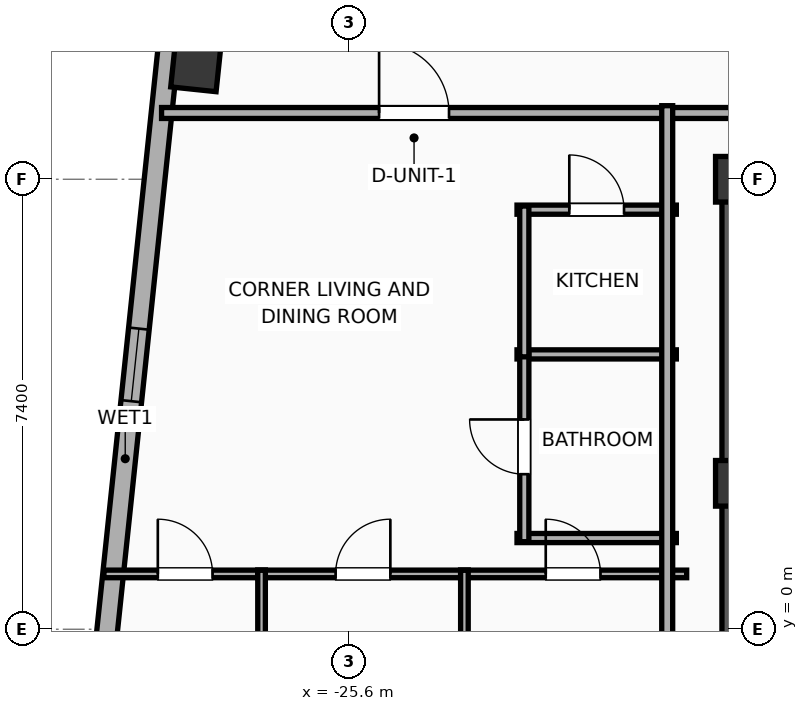
"""IFC4 building model, lengths in metres.
Left out: names, types, materials, properties, quantities, classifications, styles, units other than length and angle.
Written with IfcOpenShell. Run it as: python <this file> out.ifc"""

import sys

from ifc_helpers import new_model, si_unit, direction, frame, frame_2d, origin, origin_2d, place, context, subcontext, project, spatial, rectangle, hollow_rectangle, extrude, element, fill, save


model = new_model("IFC4")
c1 = context("Model", 3, precision=1e-05, world=origin(), true_north=direction((0.0, 1.0)))
c2 = subcontext(c1, "Body", "Model", "MODEL_VIEW")
j1 = project(units=[si_unit("LENGTHUNIT", "METRE"), si_unit("PLANEANGLEUNIT", "RADIAN")], contexts=[c1])
p1 = place(None, origin())
s1 = spatial("IfcSite", under=j1, at=p1, CompositionType="ELEMENT")
p2 = place(p1, origin())
s2 = spatial("IfcBuilding", under=s1, at=p2, CompositionType="ELEMENT")
p3 = place(p2, frame((0.0, 0.0, 271.7)))
s3 = spatial("IfcBuildingStorey", under=s2, at=p3, CompositionType="ELEMENT", Elevation=271.7)
for number, where, z_axis, x_axis in (
    (1, (-19.2, 2.4, 0.0), (0.0, 0.0, 1.0), (1.0, 0.0, 0.0)),
    (2, (-19.2, 7.4, 0.0), (0.0, 0.0, 1.0), (1.0, 0.0, 0.0)),
):
    element("IfcColumn", number, at=place(p3, frame(where, z_axis=z_axis, x_axis=x_axis)), inside=s3, PredefinedType="COLUMN", context=c2, shape_type="SweptSolid", body=[
        extrude(rectangle(XDim=0.75, YDim=0.75, at=origin_2d()), origin(), (0.0, 0.0, 1.0), 3.9),
    ])
p4 = place(p3, frame((-19.425, 7.4, 0.0), z_axis=(0.0, 0.0, 1.0), x_axis=(1.0, 0.0, 0.0)))
e3 = element("IfcWall", 3, at=p4, inside=s3, PredefinedType="SHEAR", context=c2, shape_type="SweptSolid", body=[
    extrude(rectangle(XDim=7.25, YDim=0.45, at=frame_2d((3.625, 0.0))), origin(), (0.0, 0.0, 1.0), 3.65),
])
p5 = place(p3, frame((-19.145, -7.4, 0.0), z_axis=(0.0, 0.0, 1.0), x_axis=(0.0, 1.0, 0.0)))
e4 = element("IfcWall", 4, at=p5, inside=s3, PredefinedType="SHEAR", context=c2, shape_type="SweptSolid", body=[
    extrude(rectangle(XDim=14.8, YDim=0.65, at=frame_2d((7.4, 0.0))), origin(), (0.0, 0.0, 1.0), 3.65),
])
p6 = place(p3, frame((-28.123, 9.252, 0.0), z_axis=(0.0, 0.0, 1.0), x_axis=(0.994521895368, -0.104528463268, 0.0)))
e5 = element("IfcColumn", 5, at=p6, inside=s3, PredefinedType="COLUMN", context=c2, shape_type="SweptSolid", body=[
    extrude(hollow_rectangle(XDim=0.75, YDim=0.75, WallThickness=0.025, at=origin_2d()), origin(), (0.0, 0.0, 1.0), 3.9),
])
p7 = place(p3, frame((-30.87, -12.296, 0.0), z_axis=(0.0, 0.0, 1.0), x_axis=(0.104533282919, 0.994521388791, 0.0)))
e6 = element("IfcWall", 6, at=p7, inside=s3, PredefinedType="ELEMENTEDWALL", context=c2, shape_type="SweptSolid", body=[
    extrude(rectangle(XDim=30.366, YDim=0.34, at=frame_2d((15.183, 0.0))), origin(), (0.0, 0.0, 1.0), 3.65),
])
p8 = place(p7, frame((5.842, 0.0, 0.75)))
e7 = element("IfcOpeningElement", 7, at=p8, cuts=e6, PredefinedType="OPENING", context=c2, shape_type="SweptSolid", body=[
    extrude(rectangle(XDim=1.8, YDim=2.1, at=frame_2d((0.9, 1.05))), frame((0.0, 0.18, 0.0), z_axis=(0.0, -1.0, 0.0), x_axis=(1.0, 0.0, 0.0)), (0.0, 0.0, 1.0), 0.36),
])
p9 = place(p7, frame((23.525, 0.0, 0.75)))
e8 = element("IfcOpeningElement", 8, at=p9, cuts=e6, PredefinedType="OPENING", context=c2, shape_type="SweptSolid", body=[
    extrude(rectangle(XDim=1.8, YDim=2.1, at=frame_2d((0.9, 1.05))), frame((0.0, 0.18, 0.0), z_axis=(0.0, -1.0, 0.0), x_axis=(1.0, 0.0, 0.0)), (0.0, 0.0, 1.0), 0.36),
])
p10 = place(p7, frame((27.017, 0.0, 0.75)))
e9 = element("IfcOpeningElement", 9, at=p10, cuts=e6, PredefinedType="OPENING", context=c2, shape_type="SweptSolid", body=[
    extrude(rectangle(XDim=1.2, YDim=2.05, at=frame_2d((0.6, 1.025))), frame((0.0, 0.18, 0.0), z_axis=(0.0, -1.0, 0.0), x_axis=(1.0, 0.0, 0.0)), (0.0, 0.0, 1.0), 0.36),
])
p11 = place(p7, frame((16.135, 0.0, 0.75)))
e10 = element("IfcOpeningElement", 10, at=p11, cuts=e6, PredefinedType="OPENING", context=c2, shape_type="SweptSolid", body=[
    extrude(rectangle(XDim=1.2, YDim=2.05, at=frame_2d((0.6, 1.025))), frame((0.0, 0.18, 0.0), z_axis=(0.0, -1.0, 0.0), x_axis=(1.0, 0.0, 0.0)), (0.0, 0.0, 1.0), 0.36),
])
p12 = place(p3, frame((-28.686, 8.49, 0.0), z_axis=(0.0, 0.0, 1.0), x_axis=(1.0, 0.0, 0.0)))
e11 = element("IfcWall", 11, at=p12, inside=s3, PredefinedType="PARTITIONING", context=c2, shape_type="SweptSolid", body=[
    extrude(rectangle(XDim=18.806, YDim=0.18, at=frame_2d((9.403, 0.0))), origin(), (0.0, 0.0, 1.0), 3.09),
])
p13 = place(p12, frame((3.577, 0.0, 0.0)))
e12 = element("IfcOpeningElement", 12, at=p13, cuts=e11, PredefinedType="OPENING", context=c2, shape_type="SweptSolid", body=[
    extrude(rectangle(XDim=1.15, YDim=2.05, at=frame_2d((0.575, 1.025))), frame((0.0, 0.1, 0.0), z_axis=(0.0, -1.0, 0.0), x_axis=(1.0, 0.0, 0.0)), (0.0, 0.0, 1.0), 0.2),
])
p14 = place(p3, frame((-22.84, 6.9, 0.0), z_axis=(0.0, 0.0, 1.0), x_axis=(1.0, 0.0, 0.0)))
e13 = element("IfcWall", 13, at=p14, inside=s3, PredefinedType="PLUMBINGWALL", context=c2, shape_type="SweptSolid", body=[
    extrude(rectangle(XDim=2.62, YDim=0.15, at=frame_2d((1.31, 0.0))), origin(), (0.0, 0.0, 1.0), 3.65),
])
p15 = place(p14, frame((0.86, 0.0, 0.0)))
e14 = element("IfcOpeningElement", 14, at=p15, cuts=e13, PredefinedType="OPENING", context=c2, shape_type="SweptSolid", body=[
    extrude(rectangle(XDim=0.9, YDim=2.05, at=frame_2d((0.45, 1.025))), frame((0.0, 0.085, 0.0), z_axis=(0.0, -1.0, 0.0), x_axis=(1.0, 0.0, 0.0)), (0.0, 0.0, 1.0), 0.17),
])
for number, where, z_axis, x_axis in (
    (15, (-22.84, 4.52, 0.0), (0.0, 0.0, 1.0), (1.0, 0.0, 0.0)),
    (16, (-22.84, 1.5, 0.0), (0.0, 0.0, 1.0), (1.0, 0.0, 0.0)),
):
    element("IfcWall", number, at=place(p3, frame(where, z_axis=z_axis, x_axis=x_axis)), inside=s3, PredefinedType="PLUMBINGWALL", context=c2, shape_type="SweptSolid", body=[
        extrude(rectangle(XDim=2.62, YDim=0.15, at=frame_2d((1.31, 0.0))), origin(), (0.0, 0.0, 1.0), 3.65),
    ])
p16 = place(p3, frame((-22.72, 1.44, 0.0), z_axis=(0.0, 0.0, 1.0), x_axis=(0.0, 1.0, 0.0)))
e17 = element("IfcWall", 17, at=p16, inside=s3, PredefinedType="PLUMBINGWALL", context=c2, shape_type="SweptSolid", body=[
    extrude(rectangle(XDim=3.12, YDim=0.15, at=frame_2d((1.56, 0.0))), origin(), (0.0, 0.0, 1.0), 3.65),
])
p17 = place(p16, frame((1.11, 0.0, 0.0)))
e18 = element("IfcOpeningElement", 18, at=p17, cuts=e17, PredefinedType="OPENING", context=c2, shape_type="SweptSolid", body=[
    extrude(rectangle(XDim=0.9, YDim=2.05, at=frame_2d((0.45, 1.025))), frame((0.0, 0.085, 0.0), z_axis=(0.0, -1.0, 0.0), x_axis=(1.0, 0.0, 0.0)), (0.0, 0.0, 1.0), 0.17),
])
p18 = place(p3, frame((-22.72, 4.48, 0.0), z_axis=(0.0, 0.0, 1.0), x_axis=(0.0, 1.0, 0.0)))
e19 = element("IfcWall", 19, at=p18, inside=s3, PredefinedType="PLUMBINGWALL", context=c2, shape_type="SweptSolid", body=[
    extrude(rectangle(XDim=2.48, YDim=0.15, at=frame_2d((1.24, 0.0))), origin(), (0.0, 0.0, 1.0), 3.65),
])
p19 = place(p3, frame((-29.633, 0.91, 0.0), z_axis=(0.0, 0.0, 1.0), x_axis=(1.0, 0.0, 0.0)))
e20 = element("IfcWall", 20, at=p19, inside=s3, PredefinedType="PARTITIONING", context=c2, shape_type="SweptSolid", body=[
    extrude(rectangle(XDim=2.655, YDim=0.125, at=frame_2d((1.327, 0.0))), origin(), (0.0, 0.0, 1.0), 3.65),
])
p20 = place(p19, frame((0.886, 0.0, 0.0)))
e21 = element("IfcOpeningElement", 21, at=p20, cuts=e20, PredefinedType="OPENING", context=c2, shape_type="SweptSolid", body=[
    extrude(rectangle(XDim=0.9, YDim=2.05, at=frame_2d((0.45, 1.025))), frame((0.0, 0.073, 0.0), z_axis=(0.0, -1.0, 0.0), x_axis=(1.0, 0.0, 0.0)), (0.0, 0.0, 1.0), 0.145),
])
p21 = place(p3, frame((-27.104, 0.91, 0.0), z_axis=(0.0, 0.0, 1.0), x_axis=(1.0, 0.0, 0.0)))
e22 = element("IfcWall", 22, at=p21, inside=s3, PredefinedType="PARTITIONING", context=c2, shape_type="SweptSolid", body=[
    extrude(rectangle(XDim=3.461, YDim=0.125, at=frame_2d((1.73, 0.0))), origin(), (0.0, 0.0, 1.0), 3.65),
])
p22 = place(p21, frame((1.281, 0.0, 0.0)))
e23 = element("IfcOpeningElement", 23, at=p22, cuts=e22, PredefinedType="OPENING", context=c2, shape_type="SweptSolid", body=[
    extrude(rectangle(XDim=0.9, YDim=2.05, at=frame_2d((0.45, 1.025))), frame((0.0, 0.073, 0.0), z_axis=(0.0, -1.0, 0.0), x_axis=(1.0, 0.0, 0.0)), (0.0, 0.0, 1.0), 0.145),
])
p23 = place(p3, frame((-23.768, 0.91, 0.0), z_axis=(0.0, 0.0, 1.0), x_axis=(1.0, 0.0, 0.0)))
e24 = element("IfcWall", 24, at=p23, inside=s3, PredefinedType="PARTITIONING", context=c2, shape_type="SweptSolid", body=[
    extrude(rectangle(XDim=3.718, YDim=0.125, at=frame_2d((1.859, 0.0))), origin(), (0.0, 0.0, 1.0), 3.65),
])
p24 = place(p23, frame((1.4, 0.0, 0.0)))
e25 = element("IfcOpeningElement", 25, at=p24, cuts=e24, PredefinedType="OPENING", context=c2, shape_type="SweptSolid", body=[
    extrude(rectangle(XDim=0.9, YDim=2.05, at=frame_2d((0.45, 1.025))), frame((0.0, 0.073, 0.0), z_axis=(0.0, -1.0, 0.0), x_axis=(1.0, 0.0, 0.0)), (0.0, 0.0, 1.0), 0.145),
])
for number, where, z_axis, x_axis in (
    (26, (-23.705, -8.81, 0.0), (0.0, 0.0, 1.0), (0.0, 1.0, 0.0)),
    (27, (-27.041, -8.81, 0.0), (0.0, 0.0, 1.0), (0.0, 1.0, 0.0)),
):
    element("IfcWall", number, at=place(p3, frame(where, z_axis=z_axis, x_axis=x_axis)), inside=s3, PredefinedType="PARTITIONING", context=c2, shape_type="SweptSolid", body=[
        extrude(rectangle(XDim=9.78, YDim=0.125, at=frame_2d((4.89, 0.0))), origin(), (0.0, 0.0, 1.0), 3.65),
    ])
p25 = place(p3, frame((-20.37, -8.61, 0.0), z_axis=(0.0, 0.0, 1.0), x_axis=(0.0, 1.0, 0.0)))
e28 = element("IfcWall", 28, at=p25, inside=s3, PredefinedType="PARTITIONING", context=c2, shape_type="SweptSolid", body=[
    extrude(rectangle(XDim=17.22, YDim=0.18, at=frame_2d((8.61, 0.0))), origin(), (0.0, 0.0, 1.0), 3.65),
])
p26 = place(p11, origin())
e29 = element("IfcWindow", 29, at=p26, inside=s3, PartitioningType="SINGLE_PANEL", PredefinedType="WINDOW", context=c2, shape_type="SweptSolid", body=[
    extrude(rectangle(XDim=1.2, YDim=2.05, at=frame_2d((0.6, 1.025))), frame((0.0, 0.03, 0.0), z_axis=(0.0, -1.0, 0.0), x_axis=(1.0, 0.0, 0.0)), (0.0, 0.0, 1.0), 0.06),
])
fill(e10, e29)
p27 = place(p13, origin())
e30 = element("IfcDoor", 30, at=p27, inside=s3, OperationType="SINGLE_SWING_LEFT", PredefinedType="DOOR", context=c2, shape_type="SweptSolid", body=[
    extrude(rectangle(XDim=1.15, YDim=2.05, at=frame_2d((0.575, 1.025))), frame((0.0, 0.025, 0.0), z_axis=(0.0, -1.0, 0.0), x_axis=(1.0, 0.0, 0.0)), (0.0, 0.0, 1.0), 0.05),
])
fill(e12, e30)
p28 = place(p15, origin())
e31 = element("IfcDoor", 31, at=p28, inside=s3, OperationType="SINGLE_SWING_LEFT", PredefinedType="DOOR", context=c2, shape_type="SweptSolid", body=[
    extrude(rectangle(XDim=0.9, YDim=2.05, at=frame_2d((0.45, 1.025))), frame((0.0, 0.025, 0.0), z_axis=(0.0, -1.0, 0.0), x_axis=(1.0, 0.0, 0.0)), (0.0, 0.0, 1.0), 0.05),
])
fill(e14, e31)
p29 = place(p17, origin())
e32 = element("IfcDoor", 32, at=p29, inside=s3, OperationType="SINGLE_SWING_RIGHT", PredefinedType="DOOR", context=c2, shape_type="SweptSolid", body=[
    extrude(rectangle(XDim=0.9, YDim=2.05, at=frame_2d((0.45, 1.025))), frame((0.0, 0.025, 0.0), z_axis=(0.0, -1.0, 0.0), x_axis=(1.0, 0.0, 0.0)), (0.0, 0.0, 1.0), 0.05),
])
fill(e18, e32)
p30 = place(p20, origin())
e33 = element("IfcDoor", 33, at=p30, inside=s3, OperationType="SINGLE_SWING_LEFT", PredefinedType="DOOR", context=c2, shape_type="SweptSolid", body=[
    extrude(rectangle(XDim=0.9, YDim=2.05, at=frame_2d((0.45, 1.025))), frame((0.0, 0.025, 0.0), z_axis=(0.0, -1.0, 0.0), x_axis=(1.0, 0.0, 0.0)), (0.0, 0.0, 1.0), 0.05),
])
fill(e21, e33)
p31 = place(p22, origin())
e34 = element("IfcDoor", 34, at=p31, inside=s3, OperationType="SINGLE_SWING_RIGHT", PredefinedType="DOOR", context=c2, shape_type="SweptSolid", body=[
    extrude(rectangle(XDim=0.9, YDim=2.05, at=frame_2d((0.45, 1.025))), frame((0.0, 0.025, 0.0), z_axis=(0.0, -1.0, 0.0), x_axis=(1.0, 0.0, 0.0)), (0.0, 0.0, 1.0), 0.05),
])
fill(e23, e34)
p32 = place(p24, origin())
e35 = element("IfcDoor", 35, at=p32, inside=s3, OperationType="SINGLE_SWING_LEFT", PredefinedType="DOOR", context=c2, shape_type="SweptSolid", body=[
    extrude(rectangle(XDim=0.9, YDim=2.05, at=frame_2d((0.45, 1.025))), frame((0.0, 0.025, 0.0), z_axis=(0.0, -1.0, 0.0), x_axis=(1.0, 0.0, 0.0)), (0.0, 0.0, 1.0), 0.05),
])
fill(e25, e35)
save(model, sys.argv[1])
